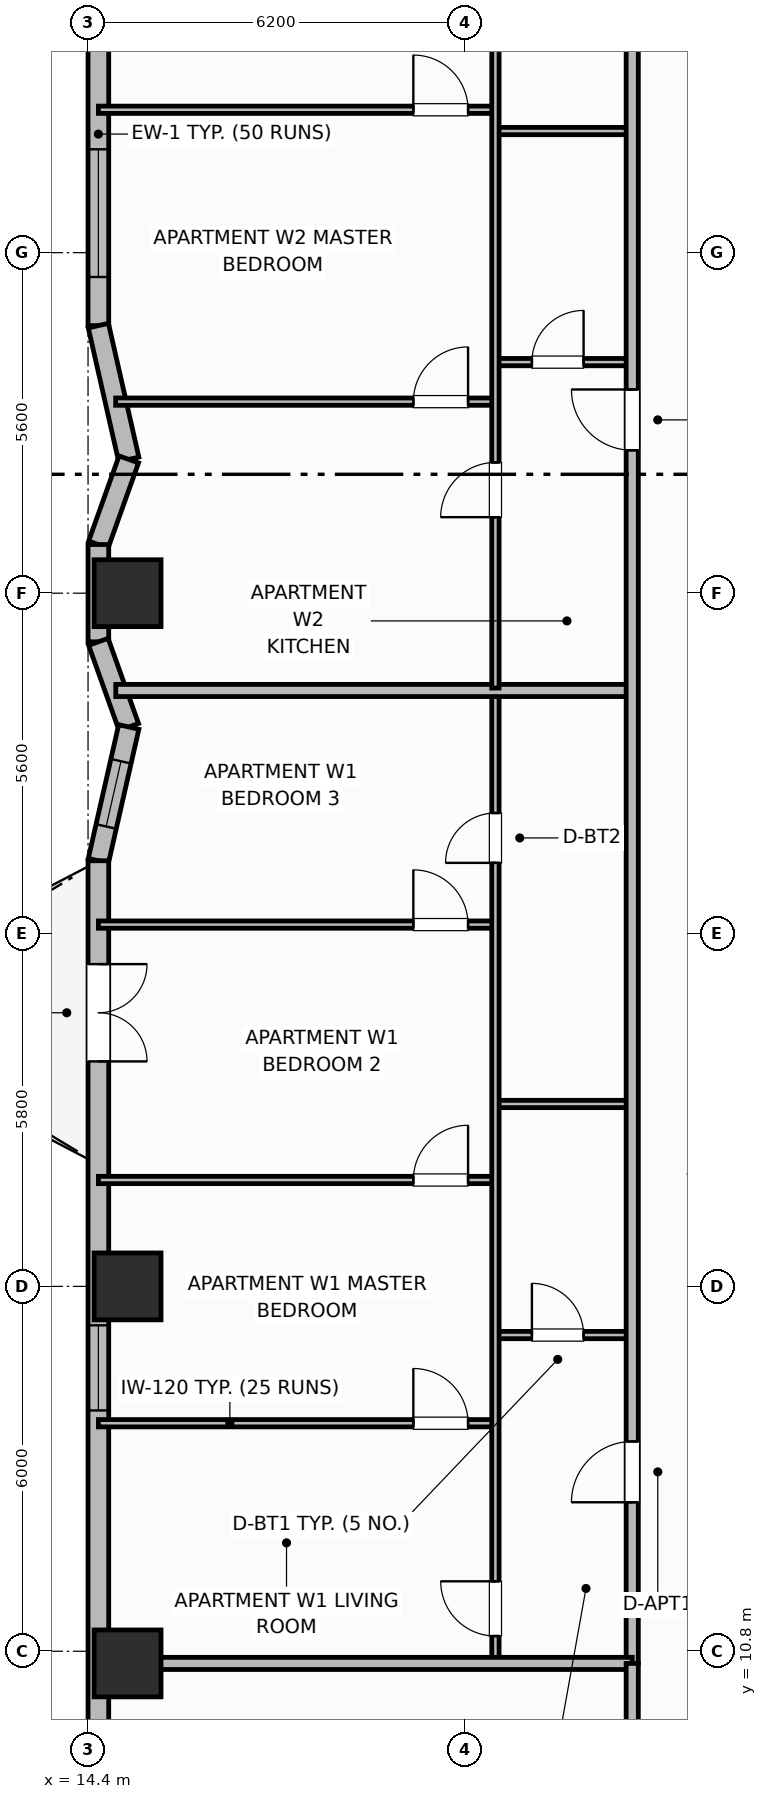
"""IFC4 building model, lengths in metres.
Left out: names, types, materials, properties, quantities, classifications, styles, units other than length and angle.
Written with IfcOpenShell. Run it as: python <this file> out.ifc"""

import sys

from ifc_helpers import new_model, si_unit, direction, frame, frame_2d, origin, origin_2d, place, context, subcontext, project, spatial, rectangle, extrude, element, fill, save


model = new_model("IFC4")
c1 = context("Model", 3, precision=1e-05, world=origin(), true_north=direction((0.0, 1.0)))
c2 = subcontext(c1, "Body", "Model", "MODEL_VIEW")
j1 = project(units=[si_unit("LENGTHUNIT", "METRE"), si_unit("PLANEANGLEUNIT", "RADIAN")], contexts=[c1])
p1 = place(None, origin())
s1 = spatial("IfcSite", under=j1, at=p1, CompositionType="ELEMENT")
p2 = place(p1, origin())
s2 = spatial("IfcBuilding", under=s1, at=p2, CompositionType="ELEMENT")
p3 = place(p2, frame((0.0, 0.0, 84.1)))
s3 = spatial("IfcBuildingStorey", under=s2, at=p3, CompositionType="ELEMENT", Elevation=84.1)
for number, where, z_axis, x_axis in (
    (1, (15.05, 10.6, 0.0), (0.0, 0.0, 1.0), (1.0, 0.0, 0.0)),
    (2, (15.05, 16.8, 0.0), (0.0, 0.0, 1.0), (1.0, 0.0, 0.0)),
    (3, (15.05, 28.2, 0.0), (0.0, 0.0, 1.0), (1.0, 0.0, 0.0)),
):
    element("IfcColumn", number, at=place(p3, frame(where, z_axis=z_axis, x_axis=x_axis)), inside=s3, PredefinedType="COLUMN", context=c2, shape_type="SweptSolid", body=[
        extrude(rectangle(XDim=1.1, YDim=1.1, at=origin_2d()), origin(), (0.0, 0.0, 1.0), 4.2),
    ])
p4 = place(p3, frame((14.57, 47.4, 0.0), z_axis=(0.0, 0.0, 1.0), x_axis=(0.0, -1.0, 0.0)))
e4 = element("IfcWall", 4, at=p4, inside=s3, PredefinedType="SOLIDWALL", context=c2, shape_type="SweptSolid", body=[
    extrude(rectangle(XDim=14.8, YDim=0.34, at=frame_2d((7.4, 0.0))), origin(), (0.0, 0.0, 1.0), 3.2),
])
p5 = place(p4, frame((2.9, 0.0, 0.8)))
e5 = element("IfcOpeningElement", 5, at=p5, cuts=e4, PredefinedType="OPENING", context=c2, shape_type="SweptSolid", body=[
    extrude(rectangle(XDim=2.1, YDim=1.9, at=frame_2d((1.05, 0.95))), frame((0.0, 0.18, 0.0), z_axis=(0.0, -1.0, 0.0), x_axis=(1.0, 0.0, 0.0)), (0.0, 0.0, 1.0), 0.36),
])
p6 = place(p4, frame((8.4, 0.0, 0.85)))
e6 = element("IfcOpeningElement", 6, at=p6, cuts=e4, PredefinedType="OPENING", context=c2, shape_type="SweptSolid", body=[
    extrude(rectangle(XDim=1.4, YDim=1.85, at=frame_2d((0.7, 0.925))), frame((0.0, 0.18, 0.0), z_axis=(0.0, -1.0, 0.0), x_axis=(1.0, 0.0, 0.0)), (0.0, 0.0, 1.0), 0.36),
])
p7 = place(p4, frame((11.9, 0.0, 0.8)))
e7 = element("IfcOpeningElement", 7, at=p7, cuts=e4, PredefinedType="OPENING", context=c2, shape_type="SweptSolid", body=[
    extrude(rectangle(XDim=2.1, YDim=1.9, at=frame_2d((1.05, 0.95))), frame((0.0, 0.18, 0.0), z_axis=(0.0, -1.0, 0.0), x_axis=(1.0, 0.0, 0.0)), (0.0, 0.0, 1.0), 0.36),
])
p8 = place(p3, frame((14.57, 32.6, 0.0), z_axis=(0.0, 0.0, 1.0), x_axis=(0.221602396322, -0.975137107254, 0.0)))
e8 = element("IfcWall", 8, at=p8, inside=s3, PredefinedType="SOLIDWALL", context=c2, shape_type="SweptSolid", body=[
    extrude(rectangle(XDim=2.256, YDim=0.34, at=frame_2d((1.128, 0.0))), origin(), (0.0, 0.0, 1.0), 3.2),
])
p9 = place(p3, frame((15.07, 30.4, 0.0), z_axis=(0.0, 0.0, 1.0), x_axis=(-0.336357205213, -0.94173447983, 0.0)))
e9 = element("IfcWall", 9, at=p9, inside=s3, PredefinedType="SOLIDWALL", context=c2, shape_type="SweptSolid", body=[
    extrude(rectangle(XDim=1.487, YDim=0.34, at=frame_2d((0.743, 0.0))), origin(), (0.0, 0.0, 1.0), 3.2),
])
p10 = place(p3, frame((14.57, 29.0, 0.0), z_axis=(0.0, 0.0, 1.0), x_axis=(0.0, -1.0, 0.0)))
e10 = element("IfcWall", 10, at=p10, inside=s3, PredefinedType="SOLIDWALL", context=c2, shape_type="SweptSolid", body=[
    extrude(rectangle(XDim=1.6, YDim=0.34, at=frame_2d((0.8, 0.0))), origin(), (0.0, 0.0, 1.0), 3.2),
])
p11 = place(p3, frame((14.57, 27.4, 0.0), z_axis=(0.0, 0.0, 1.0), x_axis=(0.336357205213, -0.94173447983, 0.0)))
e11 = element("IfcWall", 11, at=p11, inside=s3, PredefinedType="SOLIDWALL", context=c2, shape_type="SweptSolid", body=[
    extrude(rectangle(XDim=1.487, YDim=0.34, at=frame_2d((0.743, 0.0))), origin(), (0.0, 0.0, 1.0), 3.2),
])
p12 = place(p3, frame((15.07, 26.0, 0.0), z_axis=(0.0, 0.0, 1.0), x_axis=(-0.221625780886, -0.975131792758, 0.0)))
e12 = element("IfcWall", 12, at=p12, inside=s3, PredefinedType="SOLIDWALL", context=c2, shape_type="SweptSolid", body=[
    extrude(rectangle(XDim=2.256, YDim=0.34, at=frame_2d((1.128, 0.0))), origin(), (0.0, 0.0, 1.0), 3.2),
])
p13 = place(p12, frame((0.578, 0.0, 0.95)))
e13 = element("IfcOpeningElement", 13, at=p13, cuts=e12, PredefinedType="OPENING", context=c2, shape_type="SweptSolid", body=[
    extrude(rectangle(XDim=1.1, YDim=1.65, at=frame_2d((0.55, 0.825))), frame((0.0, 0.18, 0.0), z_axis=(0.0, -1.0, 0.0), x_axis=(1.0, 0.0, 0.0)), (0.0, 0.0, 1.0), 0.36),
])
p14 = place(p3, frame((14.57, 23.8, 0.0), z_axis=(0.0, 0.0, 1.0), x_axis=(0.0, -1.0, 0.0)))
e14 = element("IfcWall", 14, at=p14, inside=s3, PredefinedType="SOLIDWALL", context=c2, shape_type="SweptSolid", body=[
    extrude(rectangle(XDim=14.8, YDim=0.34, at=frame_2d((7.4, 0.0))), origin(), (0.0, 0.0, 1.0), 3.2),
])
p15 = place(p14, frame((1.7, 0.0, 0.0)))
e15 = element("IfcOpeningElement", 15, at=p15, cuts=e14, PredefinedType="OPENING", context=c2, shape_type="SweptSolid", body=[
    extrude(rectangle(XDim=1.6, YDim=2.1, at=frame_2d((0.8, 1.05))), frame((0.0, 0.18, 0.0), z_axis=(0.0, -1.0, 0.0), x_axis=(1.0, 0.0, 0.0)), (0.0, 0.0, 1.0), 0.36),
])
p16 = place(p14, frame((7.64, 0.0, 0.85)))
e16 = element("IfcOpeningElement", 16, at=p16, cuts=e14, PredefinedType="OPENING", context=c2, shape_type="SweptSolid", body=[
    extrude(rectangle(XDim=1.4, YDim=1.85, at=frame_2d((0.7, 0.925))), frame((0.0, 0.18, 0.0), z_axis=(0.0, -1.0, 0.0), x_axis=(1.0, 0.0, 0.0)), (0.0, 0.0, 1.0), 0.36),
])
p17 = place(p3, frame((21.1, 16.0, 0.0), z_axis=(0.0, 0.0, 1.0), x_axis=(1.0, 0.0, 0.0)))
e17 = element("IfcWall", 17, at=p17, inside=s3, PredefinedType="PARTITIONING", context=c2, shape_type="SweptSolid", body=[
    extrude(rectangle(XDim=2.25, YDim=0.12, at=frame_2d((1.125, 0.0))), origin(), (0.0, 0.0, 1.0), 3.03),
])
p18 = place(p17, frame((0.6, 0.0, 0.0)))
e18 = element("IfcOpeningElement", 18, at=p18, cuts=e17, PredefinedType="OPENING", context=c2, shape_type="SweptSolid", body=[
    extrude(rectangle(XDim=0.85, YDim=2.1, at=frame_2d((0.425, 1.05))), frame((0.0, 0.07, 0.0), z_axis=(0.0, -1.0, 0.0), x_axis=(1.0, 0.0, 0.0)), (0.0, 0.0, 1.0), 0.14),
])
p19 = place(p3, frame((21.1, 19.8, 0.0), z_axis=(0.0, 0.0, 1.0), x_axis=(1.0, 0.0, 0.0)))
e19 = element("IfcWall", 19, at=p19, inside=s3, PredefinedType="PARTITIONING", context=c2, shape_type="SweptSolid", body=[
    extrude(rectangle(XDim=2.25, YDim=0.12, at=frame_2d((1.125, 0.0))), origin(), (0.0, 0.0, 1.0), 3.03),
])
p20 = place(p3, frame((14.57, 14.55, 0.0), z_axis=(0.0, 0.0, 1.0), x_axis=(1.0, 0.0, 0.0)))
e20 = element("IfcWall", 20, at=p20, inside=s3, PredefinedType="PARTITIONING", context=c2, shape_type="SweptSolid", body=[
    extrude(rectangle(XDim=6.53, YDim=0.12, at=frame_2d((3.265, 0.0))), origin(), (0.0, 0.0, 1.0), 3.03),
])
p21 = place(p20, frame((5.18, 0.0, 0.0)))
e21 = element("IfcOpeningElement", 21, at=p21, cuts=e20, PredefinedType="OPENING", context=c2, shape_type="SweptSolid", body=[
    extrude(rectangle(XDim=0.9, YDim=2.1, at=frame_2d((0.45, 1.05))), frame((0.0, 0.07, 0.0), z_axis=(0.0, -1.0, 0.0), x_axis=(1.0, 0.0, 0.0)), (0.0, 0.0, 1.0), 0.14),
])
p22 = place(p3, frame((14.57, 18.55, 0.0), z_axis=(0.0, 0.0, 1.0), x_axis=(1.0, 0.0, 0.0)))
e22 = element("IfcWall", 22, at=p22, inside=s3, PredefinedType="PARTITIONING", context=c2, shape_type="SweptSolid", body=[
    extrude(rectangle(XDim=6.53, YDim=0.12, at=frame_2d((3.265, 0.0))), origin(), (0.0, 0.0, 1.0), 3.03),
])
p23 = place(p22, frame((5.18, 0.0, 0.0)))
e23 = element("IfcOpeningElement", 23, at=p23, cuts=e22, PredefinedType="OPENING", context=c2, shape_type="SweptSolid", body=[
    extrude(rectangle(XDim=0.9, YDim=2.1, at=frame_2d((0.45, 1.05))), frame((0.0, 0.07, 0.0), z_axis=(0.0, -1.0, 0.0), x_axis=(1.0, 0.0, 0.0)), (0.0, 0.0, 1.0), 0.14),
])
p24 = place(p3, frame((14.57, 22.75, 0.0), z_axis=(0.0, 0.0, 1.0), x_axis=(1.0, 0.0, 0.0)))
e24 = element("IfcWall", 24, at=p24, inside=s3, PredefinedType="PARTITIONING", context=c2, shape_type="SweptSolid", body=[
    extrude(rectangle(XDim=6.53, YDim=0.12, at=frame_2d((3.265, 0.0))), origin(), (0.0, 0.0, 1.0), 3.03),
])
p25 = place(p24, frame((5.18, 0.0, 0.0)))
e25 = element("IfcOpeningElement", 25, at=p25, cuts=e24, PredefinedType="OPENING", context=c2, shape_type="SweptSolid", body=[
    extrude(rectangle(XDim=0.9, YDim=2.1, at=frame_2d((0.45, 1.05))), frame((0.0, 0.07, 0.0), z_axis=(0.0, -1.0, 0.0), x_axis=(1.0, 0.0, 0.0)), (0.0, 0.0, 1.0), 0.14),
])
p26 = place(p3, frame((21.1, 10.64, 0.0), z_axis=(0.0, 0.0, 1.0), x_axis=(0.0, 1.0, 0.0)))
e26 = element("IfcWall", 26, at=p26, inside=s3, PredefinedType="PARTITIONING", context=c2, shape_type="SweptSolid", body=[
    extrude(rectangle(XDim=15.92, YDim=0.12, at=frame_2d((7.96, 0.0))), origin(), (0.0, 0.0, 1.0), 3.03),
])
p27 = place(p26, frame((0.41, 0.0, 0.0)))
e27 = element("IfcOpeningElement", 27, at=p27, cuts=e26, PredefinedType="OPENING", context=c2, shape_type="SweptSolid", body=[
    extrude(rectangle(XDim=0.9, YDim=2.1, at=frame_2d((0.45, 1.05))), frame((0.0, 0.07, 0.0), z_axis=(0.0, -1.0, 0.0), x_axis=(1.0, 0.0, 0.0)), (0.0, 0.0, 1.0), 0.14),
])
p28 = place(p26, frame((13.125, 0.0, 0.0)))
e28 = element("IfcOpeningElement", 28, at=p28, cuts=e26, PredefinedType="OPENING", context=c2, shape_type="SweptSolid", body=[
    extrude(rectangle(XDim=0.82, YDim=2.08, at=frame_2d((0.41, 1.04))), frame((0.0, 0.07, 0.0), z_axis=(0.0, -1.0, 0.0), x_axis=(1.0, 0.0, 0.0)), (0.0, 0.0, 1.0), 0.14),
])
p29 = place(p3, frame((14.856, 26.6, 0.0), z_axis=(0.0, 0.0, 1.0), x_axis=(1.0, 0.0, 0.0)))
e29 = element("IfcWall", 29, at=p29, inside=s3, PredefinedType="PARTITIONING", context=c2, shape_type="SweptSolid", body=[
    extrude(rectangle(XDim=8.494, YDim=0.2, at=frame_2d((4.247, 0.0))), origin(), (0.0, 0.0, 1.0), 3.03),
])
p30 = place(p3, frame((21.1, 32.0, 0.0), z_axis=(0.0, 0.0, 1.0), x_axis=(1.0, 0.0, 0.0)))
e30 = element("IfcWall", 30, at=p30, inside=s3, PredefinedType="PARTITIONING", context=c2, shape_type="SweptSolid", body=[
    extrude(rectangle(XDim=2.25, YDim=0.12, at=frame_2d((1.125, 0.0))), origin(), (0.0, 0.0, 1.0), 3.03),
])
p31 = place(p30, frame((0.6, 0.0, 0.0)))
e31 = element("IfcOpeningElement", 31, at=p31, cuts=e30, PredefinedType="OPENING", context=c2, shape_type="SweptSolid", body=[
    extrude(rectangle(XDim=0.85, YDim=2.1, at=frame_2d((0.425, 1.05))), frame((0.0, 0.07, 0.0), z_axis=(0.0, -1.0, 0.0), x_axis=(1.0, 0.0, 0.0)), (0.0, 0.0, 1.0), 0.14),
])
p32 = place(p3, frame((21.1, 35.8, 0.0), z_axis=(0.0, 0.0, 1.0), x_axis=(1.0, 0.0, 0.0)))
e32 = element("IfcWall", 32, at=p32, inside=s3, PredefinedType="PARTITIONING", context=c2, shape_type="SweptSolid", body=[
    extrude(rectangle(XDim=2.25, YDim=0.12, at=frame_2d((1.125, 0.0))), origin(), (0.0, 0.0, 1.0), 3.03),
])
p33 = place(p3, frame((14.854, 31.35, 0.0), z_axis=(0.0, 0.0, 1.0), x_axis=(1.0, 0.0, 0.0)))
e33 = element("IfcWall", 33, at=p33, inside=s3, PredefinedType="PARTITIONING", context=c2, shape_type="SweptSolid", body=[
    extrude(rectangle(XDim=6.246, YDim=0.12, at=frame_2d((3.123, 0.0))), origin(), (0.0, 0.0, 1.0), 3.03),
])
p34 = place(p33, frame((4.896, 0.0, 0.0)))
e34 = element("IfcOpeningElement", 34, at=p34, cuts=e33, PredefinedType="OPENING", context=c2, shape_type="SweptSolid", body=[
    extrude(rectangle(XDim=0.9, YDim=2.1, at=frame_2d((0.45, 1.05))), frame((0.0, 0.07, 0.0), z_axis=(0.0, -1.0, 0.0), x_axis=(1.0, 0.0, 0.0)), (0.0, 0.0, 1.0), 0.14),
])
p35 = place(p3, frame((14.57, 36.15, 0.0), z_axis=(0.0, 0.0, 1.0), x_axis=(1.0, 0.0, 0.0)))
e35 = element("IfcWall", 35, at=p35, inside=s3, PredefinedType="PARTITIONING", context=c2, shape_type="SweptSolid", body=[
    extrude(rectangle(XDim=6.53, YDim=0.12, at=frame_2d((3.265, 0.0))), origin(), (0.0, 0.0, 1.0), 3.03),
])
p36 = place(p35, frame((5.18, 0.0, 0.0)))
e36 = element("IfcOpeningElement", 36, at=p36, cuts=e35, PredefinedType="OPENING", context=c2, shape_type="SweptSolid", body=[
    extrude(rectangle(XDim=0.9, YDim=2.1, at=frame_2d((0.45, 1.05))), frame((0.0, 0.07, 0.0), z_axis=(0.0, -1.0, 0.0), x_axis=(1.0, 0.0, 0.0)), (0.0, 0.0, 1.0), 0.14),
])
p37 = place(p3, frame((21.1, 26.64, 0.0), z_axis=(0.0, 0.0, 1.0), x_axis=(0.0, 1.0, 0.0)))
e37 = element("IfcWall", 37, at=p37, inside=s3, PredefinedType="PARTITIONING", context=c2, shape_type="SweptSolid", body=[
    extrude(rectangle(XDim=19.12, YDim=0.12, at=frame_2d((9.56, 0.0))), origin(), (0.0, 0.0, 1.0), 3.03),
])
p38 = place(p37, frame((2.81, 0.0, 0.0)))
e38 = element("IfcOpeningElement", 38, at=p38, cuts=e37, PredefinedType="OPENING", context=c2, shape_type="SweptSolid", body=[
    extrude(rectangle(XDim=0.9, YDim=2.1, at=frame_2d((0.45, 1.05))), frame((0.0, 0.07, 0.0), z_axis=(0.0, -1.0, 0.0), x_axis=(1.0, 0.0, 0.0)), (0.0, 0.0, 1.0), 0.14),
])
p39 = place(p37, frame((16.18, 0.0, 0.0)))
e39 = element("IfcOpeningElement", 39, at=p39, cuts=e37, PredefinedType="OPENING", context=c2, shape_type="SweptSolid", body=[
    extrude(rectangle(XDim=0.82, YDim=2.08, at=frame_2d((0.41, 1.04))), frame((0.0, 0.07, 0.0), z_axis=(0.0, -1.0, 0.0), x_axis=(1.0, 0.0, 0.0)), (0.0, 0.0, 1.0), 0.14),
])
p40 = place(p3, frame((23.35, 10.6, 0.0), z_axis=(0.0, 0.0, 1.0), x_axis=(0.0, 1.0, 0.0)))
e40 = element("IfcWall", 40, at=p40, inside=s3, PredefinedType="PARTITIONING", context=c2, shape_type="SweptSolid", body=[
    extrude(rectangle(XDim=35.2, YDim=0.2, at=frame_2d((17.6, 0.0))), origin(), (0.0, 0.0, 1.0), 3.03),
])
p41 = place(p40, frame((2.65, 0.0, 0.0)))
e41 = element("IfcOpeningElement", 41, at=p41, cuts=e40, PredefinedType="OPENING", context=c2, shape_type="SweptSolid", body=[
    extrude(rectangle(XDim=1.0, YDim=2.15, at=frame_2d((0.5, 1.075))), frame((0.0, 0.11, 0.0), z_axis=(0.0, -1.0, 0.0), x_axis=(1.0, 0.0, 0.0)), (0.0, 0.0, 1.0), 0.22),
])
p42 = place(p40, frame((19.95, 0.0, 0.0)))
e42 = element("IfcOpeningElement", 42, at=p42, cuts=e40, PredefinedType="OPENING", context=c2, shape_type="SweptSolid", body=[
    extrude(rectangle(XDim=1.0, YDim=2.15, at=frame_2d((0.5, 1.075))), frame((0.0, 0.11, 0.0), z_axis=(0.0, -1.0, 0.0), x_axis=(1.0, 0.0, 0.0)), (0.0, 0.0, 1.0), 0.22),
])
p43 = place(p3, frame((14.99, 10.6, 0.0), z_axis=(0.0, 0.0, 1.0), x_axis=(1.0, 0.0, 0.0)))
e43 = element("IfcWall", 43, at=p43, inside=s3, PredefinedType="PARTITIONING", context=c2, shape_type="SweptSolid", body=[
    extrude(rectangle(XDim=8.36, YDim=0.2, at=frame_2d((4.18, 0.0))), origin(), (0.0, 0.0, 1.0), 3.03),
])
p44 = place(p3, frame((23.35, 4.97, 0.0), z_axis=(0.0, 0.0, 1.0), x_axis=(0.0, 1.0, 0.0)))
e44 = element("IfcWall", 44, at=p44, inside=s3, PredefinedType="PARTITIONING", context=c2, shape_type="SweptSolid", body=[
    extrude(rectangle(XDim=5.63, YDim=0.2, at=frame_2d((2.815, 0.0))), origin(), (0.0, 0.0, 1.0), 3.03),
])
p45 = place(p7, origin())
e45 = element("IfcWindow", 45, at=p45, inside=s3, PartitioningType="SINGLE_PANEL", PredefinedType="WINDOW", context=c2, shape_type="SweptSolid", body=[
    extrude(rectangle(XDim=2.1, YDim=1.9, at=frame_2d((1.05, 0.95))), frame((0.0, 0.03, 0.0), z_axis=(0.0, -1.0, 0.0), x_axis=(1.0, 0.0, 0.0)), (0.0, 0.0, 1.0), 0.06),
])
fill(e7, e45)
p46 = place(p13, origin())
e46 = element("IfcWindow", 46, at=p46, inside=s3, PartitioningType="SINGLE_PANEL", PredefinedType="WINDOW", context=c2, shape_type="SweptSolid", body=[
    extrude(rectangle(XDim=1.1, YDim=1.65, at=frame_2d((0.55, 0.825))), frame((0.0, 0.03, 0.0), z_axis=(0.0, -1.0, 0.0), x_axis=(1.0, 0.0, 0.0)), (0.0, 0.0, 1.0), 0.06),
])
fill(e13, e46)
p47 = place(p15, origin())
e47 = element("IfcDoor", 47, at=p47, inside=s3, OperationType="DOUBLE_DOOR_SINGLE_SWING", PredefinedType="DOOR", context=c2, shape_type="SweptSolid", body=[
    extrude(rectangle(XDim=1.6, YDim=2.1, at=frame_2d((0.8, 1.05))), frame((0.0, 0.025, 0.0), z_axis=(0.0, -1.0, 0.0), x_axis=(1.0, 0.0, 0.0)), (0.0, 0.0, 1.0), 0.05),
])
fill(e15, e47)
p48 = place(p16, origin())
e48 = element("IfcWindow", 48, at=p48, inside=s3, PartitioningType="SINGLE_PANEL", PredefinedType="WINDOW", context=c2, shape_type="SweptSolid", body=[
    extrude(rectangle(XDim=1.4, YDim=1.85, at=frame_2d((0.7, 0.925))), frame((0.0, 0.03, 0.0), z_axis=(0.0, -1.0, 0.0), x_axis=(1.0, 0.0, 0.0)), (0.0, 0.0, 1.0), 0.06),
])
fill(e16, e48)
p49 = place(p18, origin())
e49 = element("IfcDoor", 49, at=p49, inside=s3, OperationType="SINGLE_SWING_LEFT", PredefinedType="DOOR", context=c2, shape_type="SweptSolid", body=[
    extrude(rectangle(XDim=0.85, YDim=2.1, at=frame_2d((0.425, 1.05))), frame((0.0, 0.025, 0.0), z_axis=(0.0, -1.0, 0.0), x_axis=(1.0, 0.0, 0.0)), (0.0, 0.0, 1.0), 0.05),
])
fill(e18, e49)
p50 = place(p21, origin())
e50 = element("IfcDoor", 50, at=p50, inside=s3, OperationType="SINGLE_SWING_LEFT", PredefinedType="DOOR", context=c2, shape_type="SweptSolid", body=[
    extrude(rectangle(XDim=0.9, YDim=2.1, at=frame_2d((0.45, 1.05))), frame((0.0, 0.025, 0.0), z_axis=(0.0, -1.0, 0.0), x_axis=(1.0, 0.0, 0.0)), (0.0, 0.0, 1.0), 0.05),
])
fill(e21, e50)
p51 = place(p23, origin())
e51 = element("IfcDoor", 51, at=p51, inside=s3, OperationType="SINGLE_SWING_RIGHT", PredefinedType="DOOR", context=c2, shape_type="SweptSolid", body=[
    extrude(rectangle(XDim=0.9, YDim=2.1, at=frame_2d((0.45, 1.05))), frame((0.0, 0.025, 0.0), z_axis=(0.0, -1.0, 0.0), x_axis=(1.0, 0.0, 0.0)), (0.0, 0.0, 1.0), 0.05),
])
fill(e23, e51)
p52 = place(p25, origin())
e52 = element("IfcDoor", 52, at=p52, inside=s3, OperationType="SINGLE_SWING_LEFT", PredefinedType="DOOR", context=c2, shape_type="SweptSolid", body=[
    extrude(rectangle(XDim=0.9, YDim=2.1, at=frame_2d((0.45, 1.05))), frame((0.0, 0.025, 0.0), z_axis=(0.0, -1.0, 0.0), x_axis=(1.0, 0.0, 0.0)), (0.0, 0.0, 1.0), 0.05),
])
fill(e25, e52)
p53 = place(p27, origin())
e53 = element("IfcDoor", 53, at=p53, inside=s3, OperationType="SINGLE_SWING_RIGHT", PredefinedType="DOOR", context=c2, shape_type="SweptSolid", body=[
    extrude(rectangle(XDim=0.9, YDim=2.1, at=frame_2d((0.45, 1.05))), frame((0.0, 0.025, 0.0), z_axis=(0.0, -1.0, 0.0), x_axis=(1.0, 0.0, 0.0)), (0.0, 0.0, 1.0), 0.05),
])
fill(e27, e53)
p54 = place(p28, origin())
e54 = element("IfcDoor", 54, at=p54, inside=s3, OperationType="SINGLE_SWING_LEFT", PredefinedType="DOOR", context=c2, shape_type="SweptSolid", body=[
    extrude(rectangle(XDim=0.82, YDim=2.08, at=frame_2d((0.41, 1.04))), frame((0.0, 0.025, 0.0), z_axis=(0.0, -1.0, 0.0), x_axis=(1.0, 0.0, 0.0)), (0.0, 0.0, 1.0), 0.05),
])
fill(e28, e54)
p55 = place(p31, origin())
e55 = element("IfcDoor", 55, at=p55, inside=s3, OperationType="SINGLE_SWING_RIGHT", PredefinedType="DOOR", context=c2, shape_type="SweptSolid", body=[
    extrude(rectangle(XDim=0.85, YDim=2.1, at=frame_2d((0.425, 1.05))), frame((0.0, 0.025, 0.0), z_axis=(0.0, -1.0, 0.0), x_axis=(1.0, 0.0, 0.0)), (0.0, 0.0, 1.0), 0.05),
])
fill(e31, e55)
p56 = place(p34, origin())
e56 = element("IfcDoor", 56, at=p56, inside=s3, OperationType="SINGLE_SWING_RIGHT", PredefinedType="DOOR", context=c2, shape_type="SweptSolid", body=[
    extrude(rectangle(XDim=0.9, YDim=2.1, at=frame_2d((0.45, 1.05))), frame((0.0, 0.025, 0.0), z_axis=(0.0, -1.0, 0.0), x_axis=(1.0, 0.0, 0.0)), (0.0, 0.0, 1.0), 0.05),
])
fill(e34, e56)
p57 = place(p36, origin())
e57 = element("IfcDoor", 57, at=p57, inside=s3, OperationType="SINGLE_SWING_LEFT", PredefinedType="DOOR", context=c2, shape_type="SweptSolid", body=[
    extrude(rectangle(XDim=0.9, YDim=2.1, at=frame_2d((0.45, 1.05))), frame((0.0, 0.025, 0.0), z_axis=(0.0, -1.0, 0.0), x_axis=(1.0, 0.0, 0.0)), (0.0, 0.0, 1.0), 0.05),
])
fill(e36, e57)
p58 = place(p38, origin())
e58 = element("IfcDoor", 58, at=p58, inside=s3, OperationType="SINGLE_SWING_LEFT", PredefinedType="DOOR", context=c2, shape_type="SweptSolid", body=[
    extrude(rectangle(XDim=0.9, YDim=2.1, at=frame_2d((0.45, 1.05))), frame((0.0, 0.025, 0.0), z_axis=(0.0, -1.0, 0.0), x_axis=(1.0, 0.0, 0.0)), (0.0, 0.0, 1.0), 0.05),
])
fill(e38, e58)
p59 = place(p41, origin())
e59 = element("IfcDoor", 59, at=p59, inside=s3, OperationType="SINGLE_SWING_LEFT", PredefinedType="DOOR", context=c2, shape_type="SweptSolid", body=[
    extrude(rectangle(XDim=1.0, YDim=2.15, at=frame_2d((0.5, 1.075))), frame((0.0, 0.025, 0.0), z_axis=(0.0, -1.0, 0.0), x_axis=(1.0, 0.0, 0.0)), (0.0, 0.0, 1.0), 0.05),
])
fill(e41, e59)
p60 = place(p42, origin())
e60 = element("IfcDoor", 60, at=p60, inside=s3, OperationType="SINGLE_SWING_RIGHT", PredefinedType="DOOR", context=c2, shape_type="SweptSolid", body=[
    extrude(rectangle(XDim=1.0, YDim=2.15, at=frame_2d((0.5, 1.075))), frame((0.0, 0.025, 0.0), z_axis=(0.0, -1.0, 0.0), x_axis=(1.0, 0.0, 0.0)), (0.0, 0.0, 1.0), 0.05),
])
fill(e42, e60)
save(model, sys.argv[1])
